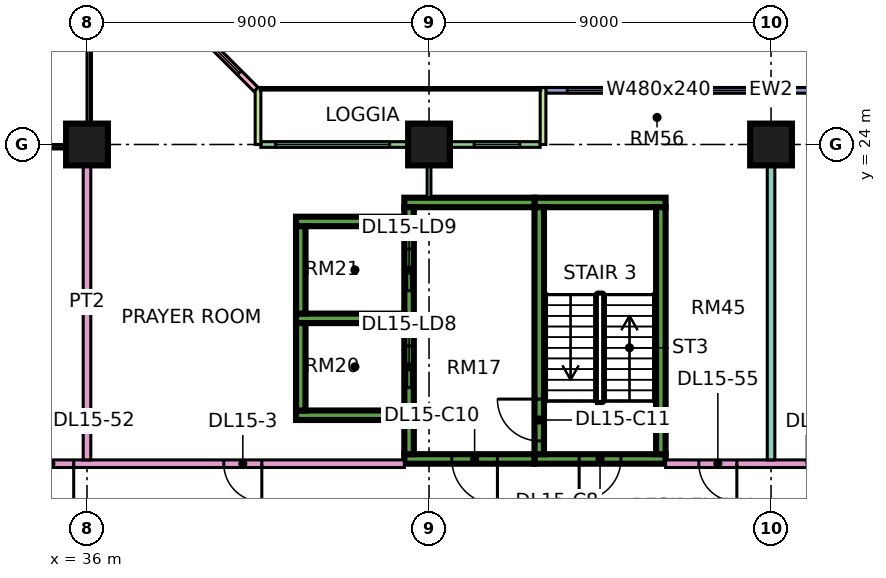
"""IFC4 building model, lengths in metres.
Left out: names, types, materials, properties, quantities, classifications, styles, units other than length and angle.
Written with IfcOpenShell. Run it as: python <this file> out.ifc"""

import sys

from ifc_helpers import new_model, si_unit, direction, frame, frame_2d, origin, origin_2d, place, context, subcontext, project, spatial, rectangle, extrude, element, fill, save


model = new_model("IFC4")
c1 = context("Model", 3, precision=1e-05, world=origin(), true_north=direction((0.0, 1.0)))
c2 = subcontext(c1, "Body", "Model", "MODEL_VIEW")
j1 = project(units=[si_unit("LENGTHUNIT", "METRE"), si_unit("PLANEANGLEUNIT", "RADIAN")], contexts=[c1])
p1 = place(None, origin())
s1 = spatial("IfcSite", under=j1, at=p1, CompositionType="ELEMENT")
p2 = place(p1, origin())
s2 = spatial("IfcBuilding", under=s1, at=p2, CompositionType="ELEMENT")
p3 = place(p2, frame((0.0, 0.0, 71.4)))
s3 = spatial("IfcBuildingStorey", under=s2, at=p3, CompositionType="ELEMENT", Elevation=71.4)
for number, where, z_axis, x_axis in (
    (1, (36.0, 24.0, 0.0), (0.0, 0.0, 1.0), (1.0, 0.0, 0.0)),
    (2, (45.0, 24.0, 0.0), (0.0, 0.0, 1.0), (1.0, 0.0, 0.0)),
    (3, (54.0, 24.0, 0.0), (0.0, 0.0, 1.0), (1.0, 0.0, 0.0)),
):
    element("IfcColumn", number, at=place(p3, frame(where, z_axis=z_axis, x_axis=x_axis)), inside=s3, PredefinedType="COLUMN", context=c2, shape_type="SweptSolid", body=[
        extrude(rectangle(XDim=1.1, YDim=1.1, at=origin_2d()), origin(), (0.0, 0.0, 1.0), 3.75),
    ])
p4 = place(p3, frame((47.775, 15.725, 0.0), z_axis=(0.0, 0.0, 1.0), x_axis=(1.0, 0.0, 0.0)))
e4 = element("IfcWall", 4, at=p4, inside=s3, PredefinedType="SHEAR", context=c2, shape_type="SweptSolid", body=[
    extrude(rectangle(XDim=3.45, YDim=0.25, at=frame_2d((1.725, 0.0))), origin(), (0.0, 0.0, 1.0), 3.75),
])
p5 = place(p4, frame((1.175, 0.0, 0.0)))
e5 = element("IfcOpeningElement", 5, at=p5, cuts=e4, PredefinedType="OPENING", context=c2, shape_type="SweptSolid", body=[
    extrude(rectangle(XDim=1.1, YDim=2.2, at=frame_2d((0.55, 1.1))), frame((0.0, 0.135, 0.0), z_axis=(0.0, -1.0, 0.0), x_axis=(1.0, 0.0, 0.0)), (0.0, 0.0, 1.0), 0.27),
])
p6 = place(p3, frame((47.775, 22.475, 0.0), z_axis=(0.0, 0.0, 1.0), x_axis=(1.0, 0.0, 0.0)))
e6 = element("IfcWall", 6, at=p6, inside=s3, PredefinedType="SHEAR", context=c2, shape_type="SweptSolid", body=[
    extrude(rectangle(XDim=3.45, YDim=0.25, at=frame_2d((1.725, 0.0))), origin(), (0.0, 0.0, 1.0), 3.75),
])
p7 = place(p3, frame((47.9, 15.85, 0.0), z_axis=(0.0, 0.0, 1.0), x_axis=(0.0, 1.0, 0.0)))
e7 = element("IfcWall", 7, at=p7, inside=s3, PredefinedType="SHEAR", context=c2, shape_type="SweptSolid", body=[
    extrude(rectangle(XDim=6.5, YDim=0.25, at=frame_2d((3.25, 0.0))), origin(), (0.0, 0.0, 1.0), 3.75),
])
p8 = place(p7, frame((0.35, 0.0, 0.0)))
e8 = element("IfcOpeningElement", 8, at=p8, cuts=e7, PredefinedType="OPENING", context=c2, shape_type="SweptSolid", body=[
    extrude(rectangle(XDim=1.1, YDim=2.2, at=frame_2d((0.55, 1.1))), frame((0.0, 0.135, 0.0), z_axis=(0.0, -1.0, 0.0), x_axis=(1.0, 0.0, 0.0)), (0.0, 0.0, 1.0), 0.27),
])
p9 = place(p3, frame((51.1, 15.85, 0.0), z_axis=(0.0, 0.0, 1.0), x_axis=(0.0, 1.0, 0.0)))
e9 = element("IfcWall", 9, at=p9, inside=s3, PredefinedType="SHEAR", context=c2, shape_type="SweptSolid", body=[
    extrude(rectangle(XDim=6.5, YDim=0.25, at=frame_2d((3.25, 0.0))), origin(), (0.0, 0.0, 1.0), 3.75),
])
p10 = place(p3, frame((44.35, 15.725, 0.0), z_axis=(0.0, 0.0, 1.0), x_axis=(1.0, 0.0, 0.0)))
e10 = element("IfcWall", 10, at=p10, inside=s3, PredefinedType="SHEAR", context=c2, shape_type="SweptSolid", body=[
    extrude(rectangle(XDim=3.425, YDim=0.25, at=frame_2d((1.712, 0.0))), origin(), (0.0, 0.0, 1.0), 3.75),
])
p11 = place(p10, frame((1.25, 0.0, 0.0)))
e11 = element("IfcOpeningElement", 11, at=p11, cuts=e10, PredefinedType="OPENING", context=c2, shape_type="SweptSolid", body=[
    extrude(rectangle(XDim=1.2, YDim=2.2, at=frame_2d((0.6, 1.1))), frame((0.0, 0.135, 0.0), z_axis=(0.0, -1.0, 0.0), x_axis=(1.0, 0.0, 0.0)), (0.0, 0.0, 1.0), 0.27),
])
p12 = place(p3, frame((44.35, 22.475, 0.0), z_axis=(0.0, 0.0, 1.0), x_axis=(1.0, 0.0, 0.0)))
e12 = element("IfcWall", 12, at=p12, inside=s3, PredefinedType="SHEAR", context=c2, shape_type="SweptSolid", body=[
    extrude(rectangle(XDim=3.425, YDim=0.25, at=frame_2d((1.712, 0.0))), origin(), (0.0, 0.0, 1.0), 3.75),
])
p13 = place(p3, frame((44.475, 15.85, 0.0), z_axis=(0.0, 0.0, 1.0), x_axis=(0.0, 1.0, 0.0)))
e13 = element("IfcWall", 13, at=p13, inside=s3, PredefinedType="SHEAR", context=c2, shape_type="SweptSolid", body=[
    extrude(rectangle(XDim=6.5, YDim=0.25, at=frame_2d((3.25, 0.0))), origin(), (0.0, 0.0, 1.0), 3.75),
])
p14 = place(p13, frame((1.75, 0.0, 0.0)))
e14 = element("IfcOpeningElement", 14, at=p14, cuts=e13, PredefinedType="OPENING", context=c2, shape_type="SweptSolid", body=[
    extrude(rectangle(XDim=1.1, YDim=2.2, at=frame_2d((0.55, 1.1))), frame((0.0, 0.135, 0.0), z_axis=(0.0, -1.0, 0.0), x_axis=(1.0, 0.0, 0.0)), (0.0, 0.0, 1.0), 0.27),
])
p15 = place(p13, frame((4.3, 0.0, 0.0)))
e15 = element("IfcOpeningElement", 15, at=p15, cuts=e13, PredefinedType="OPENING", context=c2, shape_type="SweptSolid", body=[
    extrude(rectangle(XDim=1.1, YDim=2.2, at=frame_2d((0.55, 1.1))), frame((0.0, 0.135, 0.0), z_axis=(0.0, -1.0, 0.0), x_axis=(1.0, 0.0, 0.0)), (0.0, 0.0, 1.0), 0.27),
])
for number, where, z_axis, x_axis in (
    (16, (41.5, 16.875, 0.0), (0.0, 0.0, 1.0), (1.0, 0.0, 0.0)),
    (17, (41.5, 19.425, 0.0), (0.0, 0.0, 1.0), (1.0, 0.0, 0.0)),
    (18, (41.5, 21.975, 0.0), (0.0, 0.0, 1.0), (1.0, 0.0, 0.0)),
):
    element("IfcWall", number, at=place(p3, frame(where, z_axis=z_axis, x_axis=x_axis)), inside=s3, PredefinedType="SHEAR", context=c2, shape_type="SweptSolid", body=[
        extrude(rectangle(XDim=2.85, YDim=0.25, at=frame_2d((1.425, 0.0))), origin(), (0.0, 0.0, 1.0), 3.75),
    ])
for number, where, z_axis, x_axis in (
    (19, (41.625, 17.0, 0.0), (0.0, 0.0, 1.0), (0.0, 1.0, 0.0)),
    (20, (41.625, 19.55, 0.0), (0.0, 0.0, 1.0), (0.0, 1.0, 0.0)),
):
    element("IfcWall", number, at=place(p3, frame(where, z_axis=z_axis, x_axis=x_axis)), inside=s3, PredefinedType="SHEAR", context=c2, shape_type="SweptSolid", body=[
        extrude(rectangle(XDim=2.3, YDim=0.25, at=frame_2d((1.15, 0.0))), origin(), (0.0, 0.0, 1.0), 3.75),
    ])
p16 = place(p3, frame((59.925, 25.425, 0.0), z_axis=(0.0, 0.0, 1.0), x_axis=(-1.0, 0.0, 0.0)))
e21 = element("IfcWall", 21, at=p16, inside=s3, PredefinedType="SOLIDWALL", context=c2, shape_type="SweptSolid", body=[
    extrude(rectangle(XDim=11.85, YDim=0.15, at=frame_2d((5.925, 0.0))), origin(), (0.0, 0.0, 1.0), 3.35),
])
p17 = place(p16, frame((1.462, 0.0, 0.45)))
e22 = element("IfcOpeningElement", 22, at=p17, cuts=e21, PredefinedType="OPENING", context=c2, shape_type="SweptSolid", body=[
    extrude(rectangle(XDim=3.0, YDim=2.4, at=frame_2d((1.5, 1.2))), frame((0.0, 0.085, 0.0), z_axis=(0.0, -1.0, 0.0), x_axis=(1.0, 0.0, 0.0)), (0.0, 0.0, 1.0), 0.17),
])
p18 = place(p16, frame((6.488, 0.0, 0.45)))
e23 = element("IfcOpeningElement", 23, at=p18, cuts=e21, PredefinedType="OPENING", context=c2, shape_type="SweptSolid", body=[
    extrude(rectangle(XDim=4.8, YDim=2.4, at=frame_2d((2.4, 1.2))), frame((0.0, 0.085, 0.0), z_axis=(0.0, -1.0, 0.0), x_axis=(1.0, 0.0, 0.0)), (0.0, 0.0, 1.0), 0.17),
])
p19 = place(p3, frame((47.925, 24.0, 0.0), z_axis=(0.0, 0.0, 1.0), x_axis=(-1.0, 0.0, 0.0)))
e24 = element("IfcWall", 24, at=p19, inside=s3, PredefinedType="SOLIDWALL", context=c2, shape_type="SweptSolid", body=[
    extrude(rectangle(XDim=7.35, YDim=0.15, at=frame_2d((3.675, 0.0))), origin(), (0.0, 0.0, 1.0), 3.35),
])
p20 = place(p19, frame((0.538, 0.0, 0.45)))
e25 = element("IfcOpeningElement", 25, at=p20, cuts=e24, PredefinedType="OPENING", context=c2, shape_type="SweptSolid", body=[
    extrude(rectangle(XDim=1.2, YDim=2.4, at=frame_2d((0.6, 1.2))), frame((0.0, 0.085, 0.0), z_axis=(0.0, -1.0, 0.0), x_axis=(1.0, 0.0, 0.0)), (0.0, 0.0, 1.0), 0.17),
])
p21 = place(p19, frame((3.962, 0.0, 0.45)))
e26 = element("IfcOpeningElement", 26, at=p21, cuts=e24, PredefinedType="OPENING", context=c2, shape_type="SweptSolid", body=[
    extrude(rectangle(XDim=3.0, YDim=2.4, at=frame_2d((1.5, 1.2))), frame((0.0, 0.085, 0.0), z_axis=(0.0, -1.0, 0.0), x_axis=(1.0, 0.0, 0.0)), (0.0, 0.0, 1.0), 0.17),
])
for number, where, z_axis, x_axis in (
    (27, (48.0, 25.5, 0.0), (0.0, 0.0, 1.0), (0.0, -1.0, 0.0)),
    (28, (40.5, 25.5, 0.0), (0.0, 0.0, 1.0), (0.0, -1.0, 0.0)),
):
    element("IfcWall", number, at=place(p3, frame(where, z_axis=z_axis, x_axis=x_axis)), inside=s3, PredefinedType="SOLIDWALL", context=c2, shape_type="SweptSolid", body=[
        extrude(rectangle(XDim=1.5, YDim=0.15, at=frame_2d((0.75, 0.0))), origin(), (0.0, 0.0, 1.0), 3.35),
    ])
p22 = place(p3, frame((40.447, 25.447, 0.0), z_axis=(0.0, 0.0, 1.0), x_axis=(-0.707106781187, 0.707106781187, 0.0)))
e29 = element("IfcWall", 29, at=p22, inside=s3, PredefinedType="SOLIDWALL", context=c2, shape_type="SweptSolid", body=[
    extrude(rectangle(XDim=4.243, YDim=0.15, at=frame_2d((2.121, 0.0))), origin(), (0.0, 0.0, 1.0), 3.35),
])
p23 = place(p22, frame((0.621, 0.0, 0.45)))
e30 = element("IfcOpeningElement", 30, at=p23, cuts=e29, PredefinedType="OPENING", context=c2, shape_type="SweptSolid", body=[
    extrude(rectangle(XDim=3.0, YDim=2.4, at=frame_2d((1.5, 1.2))), frame((0.0, 0.085, 0.0), z_axis=(0.0, -1.0, 0.0), x_axis=(1.0, 0.0, 0.0)), (0.0, 0.0, 1.0), 0.17),
])
p24 = place(p3, frame((34.0, 15.6, 0.0), z_axis=(0.0, 0.0, 1.0), x_axis=(1.0, 0.0, 0.0)))
e31 = element("IfcWall", 31, at=p24, inside=s3, PredefinedType="PARTITIONING", context=c2, shape_type="SweptSolid", body=[
    extrude(rectangle(XDim=10.35, YDim=0.2, at=frame_2d((5.175, 0.0))), origin(), (0.0, 0.0, 1.0), 3.35),
])
p25 = place(p24, frame((5.6, 0.0, 0.0)))
e32 = element("IfcOpeningElement", 32, at=p25, cuts=e31, PredefinedType="OPENING", context=c2, shape_type="SweptSolid", body=[
    extrude(rectangle(XDim=1.0, YDim=2.1, at=frame_2d((0.5, 1.05))), frame((0.0, 0.11, 0.0), z_axis=(0.0, -1.0, 0.0), x_axis=(1.0, 0.0, 0.0)), (0.0, 0.0, 1.0), 0.22),
])
p26 = place(p24, frame((0.45, 0.0, 0.0)))
e33 = element("IfcOpeningElement", 33, at=p26, cuts=e31, PredefinedType="OPENING", context=c2, shape_type="SweptSolid", body=[
    extrude(rectangle(XDim=1.2, YDim=2.1, at=frame_2d((0.6, 1.05))), frame((0.0, 0.11, 0.0), z_axis=(0.0, -1.0, 0.0), x_axis=(1.0, 0.0, 0.0)), (0.0, 0.0, 1.0), 0.22),
])
p27 = place(p3, frame((36.0, 15.7, 0.0), z_axis=(0.0, 0.0, 1.0), x_axis=(0.0, 1.0, 0.0)))
e34 = element("IfcWall", 34, at=p27, inside=s3, PredefinedType="PARTITIONING", context=c2, shape_type="SweptSolid", body=[
    extrude(rectangle(XDim=8.3, YDim=0.2, at=frame_2d((4.15, 0.0))), origin(), (0.0, 0.0, 1.0), 3.35),
])
p28 = place(p3, frame((45.0, 22.6, 0.0), z_axis=(0.0, 0.0, 1.0), x_axis=(0.0, 1.0, 0.0)))
e35 = element("IfcWall", 35, at=p28, inside=s3, PredefinedType="PARTITIONING", context=c2, shape_type="SweptSolid", body=[
    extrude(rectangle(XDim=1.326, YDim=0.1, at=frame_2d((0.663, 0.0))), origin(), (0.0, 0.0, 1.0), 3.35),
])
p29 = place(p3, frame((51.225, 15.6, 0.0), z_axis=(0.0, 0.0, 1.0), x_axis=(1.0, 0.0, 0.0)))
e36 = element("IfcWall", 36, at=p29, inside=s3, PredefinedType="PARTITIONING", context=c2, shape_type="SweptSolid", body=[
    extrude(rectangle(XDim=20.701, YDim=0.2, at=frame_2d((10.351, 0.0))), origin(), (0.0, 0.0, 1.0), 3.35),
])
p30 = place(p29, frame((3.725, 0.0, 0.0)))
e37 = element("IfcOpeningElement", 37, at=p30, cuts=e36, PredefinedType="OPENING", context=c2, shape_type="SweptSolid", body=[
    extrude(rectangle(XDim=1.0, YDim=2.1, at=frame_2d((0.5, 1.05))), frame((0.0, 0.11, 0.0), z_axis=(0.0, -1.0, 0.0), x_axis=(1.0, 0.0, 0.0)), (0.0, 0.0, 1.0), 0.22),
])
p31 = place(p29, frame((0.875, 0.0, 0.0)))
e38 = element("IfcOpeningElement", 38, at=p31, cuts=e36, PredefinedType="OPENING", context=c2, shape_type="SweptSolid", body=[
    extrude(rectangle(XDim=1.0, YDim=2.1, at=frame_2d((0.5, 1.05))), frame((0.0, 0.11, 0.0), z_axis=(0.0, -1.0, 0.0), x_axis=(1.0, 0.0, 0.0)), (0.0, 0.0, 1.0), 0.22),
])
p32 = place(p3, frame((54.0, 15.7, 0.0), z_axis=(0.0, 0.0, 1.0), x_axis=(0.0, 1.0, 0.0)))
e39 = element("IfcWall", 39, at=p32, inside=s3, PredefinedType="PARTITIONING", context=c2, shape_type="SweptSolid", body=[
    extrude(rectangle(XDim=8.3, YDim=0.2, at=frame_2d((4.15, 0.0))), origin(), (0.0, 0.0, 1.0), 3.35),
])
p33 = place(p18, origin())
e40 = element("IfcWindow", 40, at=p33, inside=s3, PartitioningType="SINGLE_PANEL", PredefinedType="WINDOW", context=c2, shape_type="SweptSolid", body=[
    extrude(rectangle(XDim=4.8, YDim=2.4, at=frame_2d((2.4, 1.2))), frame((0.0, 0.03, 0.0), z_axis=(0.0, -1.0, 0.0), x_axis=(1.0, 0.0, 0.0)), (0.0, 0.0, 1.0), 0.06),
])
fill(e23, e40)
p34 = place(p20, origin())
e41 = element("IfcWindow", 41, at=p34, inside=s3, PartitioningType="SINGLE_PANEL", PredefinedType="WINDOW", context=c2, shape_type="SweptSolid", body=[
    extrude(rectangle(XDim=1.2, YDim=2.4, at=frame_2d((0.6, 1.2))), frame((0.0, 0.03, 0.0), z_axis=(0.0, -1.0, 0.0), x_axis=(1.0, 0.0, 0.0)), (0.0, 0.0, 1.0), 0.06),
])
fill(e25, e41)
p35 = place(p21, origin())
e42 = element("IfcWindow", 42, at=p35, inside=s3, PartitioningType="SINGLE_PANEL", PredefinedType="WINDOW", context=c2, shape_type="SweptSolid", body=[
    extrude(rectangle(XDim=3.0, YDim=2.4, at=frame_2d((1.5, 1.2))), frame((0.0, 0.03, 0.0), z_axis=(0.0, -1.0, 0.0), x_axis=(1.0, 0.0, 0.0)), (0.0, 0.0, 1.0), 0.06),
])
fill(e26, e42)
p36 = place(p23, origin())
e43 = element("IfcWindow", 43, at=p36, inside=s3, PartitioningType="SINGLE_PANEL", PredefinedType="WINDOW", context=c2, shape_type="SweptSolid", body=[
    extrude(rectangle(XDim=3.0, YDim=2.4, at=frame_2d((1.5, 1.2))), frame((0.0, 0.03, 0.0), z_axis=(0.0, -1.0, 0.0), x_axis=(1.0, 0.0, 0.0)), (0.0, 0.0, 1.0), 0.06),
])
fill(e30, e43)
p37 = place(p5, frame((1.1, 0.0, 0.0), z_axis=(0.0, 0.0, 1.0), x_axis=(-1.0, 0.0, 0.0)))
e44 = element("IfcDoor", 44, at=p37, inside=s3, OperationType="SINGLE_SWING_LEFT", PredefinedType="DOOR", context=c2, shape_type="SweptSolid", body=[
    extrude(rectangle(XDim=1.1, YDim=2.2, at=frame_2d((0.55, 1.1))), frame((0.0, 0.025, 0.0), z_axis=(0.0, -1.0, 0.0), x_axis=(1.0, 0.0, 0.0)), (0.0, 0.0, 1.0), 0.05),
])
fill(e5, e44)
p38 = place(p11, origin())
e45 = element("IfcDoor", 45, at=p38, inside=s3, OperationType="SINGLE_SWING_RIGHT", PredefinedType="DOOR", context=c2, shape_type="SweptSolid", body=[
    extrude(rectangle(XDim=1.2, YDim=2.2, at=frame_2d((0.6, 1.1))), frame((0.0, 0.025, 0.0), z_axis=(0.0, -1.0, 0.0), x_axis=(1.0, 0.0, 0.0)), (0.0, 0.0, 1.0), 0.05),
])
fill(e11, e45)
p39 = place(p8, frame((1.1, 0.0, 0.0), z_axis=(0.0, 0.0, 1.0), x_axis=(-1.0, 0.0, 0.0)))
e46 = element("IfcDoor", 46, at=p39, inside=s3, OperationType="SINGLE_SWING_RIGHT", PredefinedType="DOOR", context=c2, shape_type="SweptSolid", body=[
    extrude(rectangle(XDim=1.1, YDim=2.2, at=frame_2d((0.55, 1.1))), frame((0.0, 0.025, 0.0), z_axis=(0.0, -1.0, 0.0), x_axis=(1.0, 0.0, 0.0)), (0.0, 0.0, 1.0), 0.05),
])
fill(e8, e46)
p40 = place(p14, origin())
e47 = element("IfcDoor", 47, at=p40, inside=s3, OperationType="DOUBLE_DOOR_SLIDING", PredefinedType="DOOR", context=c2, shape_type="SweptSolid", body=[
    extrude(rectangle(XDim=1.1, YDim=2.2, at=frame_2d((0.55, 1.1))), frame((0.0, 0.025, 0.0), z_axis=(0.0, -1.0, 0.0), x_axis=(1.0, 0.0, 0.0)), (0.0, 0.0, 1.0), 0.05),
])
fill(e14, e47)
p41 = place(p15, origin())
e48 = element("IfcDoor", 48, at=p41, inside=s3, OperationType="DOUBLE_DOOR_SLIDING", PredefinedType="DOOR", context=c2, shape_type="SweptSolid", body=[
    extrude(rectangle(XDim=1.1, YDim=2.2, at=frame_2d((0.55, 1.1))), frame((0.0, 0.025, 0.0), z_axis=(0.0, -1.0, 0.0), x_axis=(1.0, 0.0, 0.0)), (0.0, 0.0, 1.0), 0.05),
])
fill(e15, e48)
p42 = place(p25, origin())
e49 = element("IfcDoor", 49, at=p42, inside=s3, OperationType="SINGLE_SWING_RIGHT", PredefinedType="DOOR", context=c2, shape_type="SweptSolid", body=[
    extrude(rectangle(XDim=1.0, YDim=2.1, at=frame_2d((0.5, 1.05))), frame((0.0, 0.025, 0.0), z_axis=(0.0, -1.0, 0.0), x_axis=(1.0, 0.0, 0.0)), (0.0, 0.0, 1.0), 0.05),
])
fill(e32, e49)
p43 = place(p26, origin())
e50 = element("IfcDoor", 50, at=p43, inside=s3, OperationType="SINGLE_SWING_RIGHT", PredefinedType="DOOR", context=c2, shape_type="SweptSolid", body=[
    extrude(rectangle(XDim=1.2, YDim=2.1, at=frame_2d((0.6, 1.05))), frame((0.0, 0.025, 0.0), z_axis=(0.0, -1.0, 0.0), x_axis=(1.0, 0.0, 0.0)), (0.0, 0.0, 1.0), 0.05),
])
fill(e33, e50)
p44 = place(p31, origin())
e51 = element("IfcDoor", 51, at=p44, inside=s3, OperationType="SINGLE_SWING_RIGHT", PredefinedType="DOOR", context=c2, shape_type="SweptSolid", body=[
    extrude(rectangle(XDim=1.0, YDim=2.1, at=frame_2d((0.5, 1.05))), frame((0.0, 0.025, 0.0), z_axis=(0.0, -1.0, 0.0), x_axis=(1.0, 0.0, 0.0)), (0.0, 0.0, 1.0), 0.05),
])
fill(e38, e51)
save(model, sys.argv[1])
